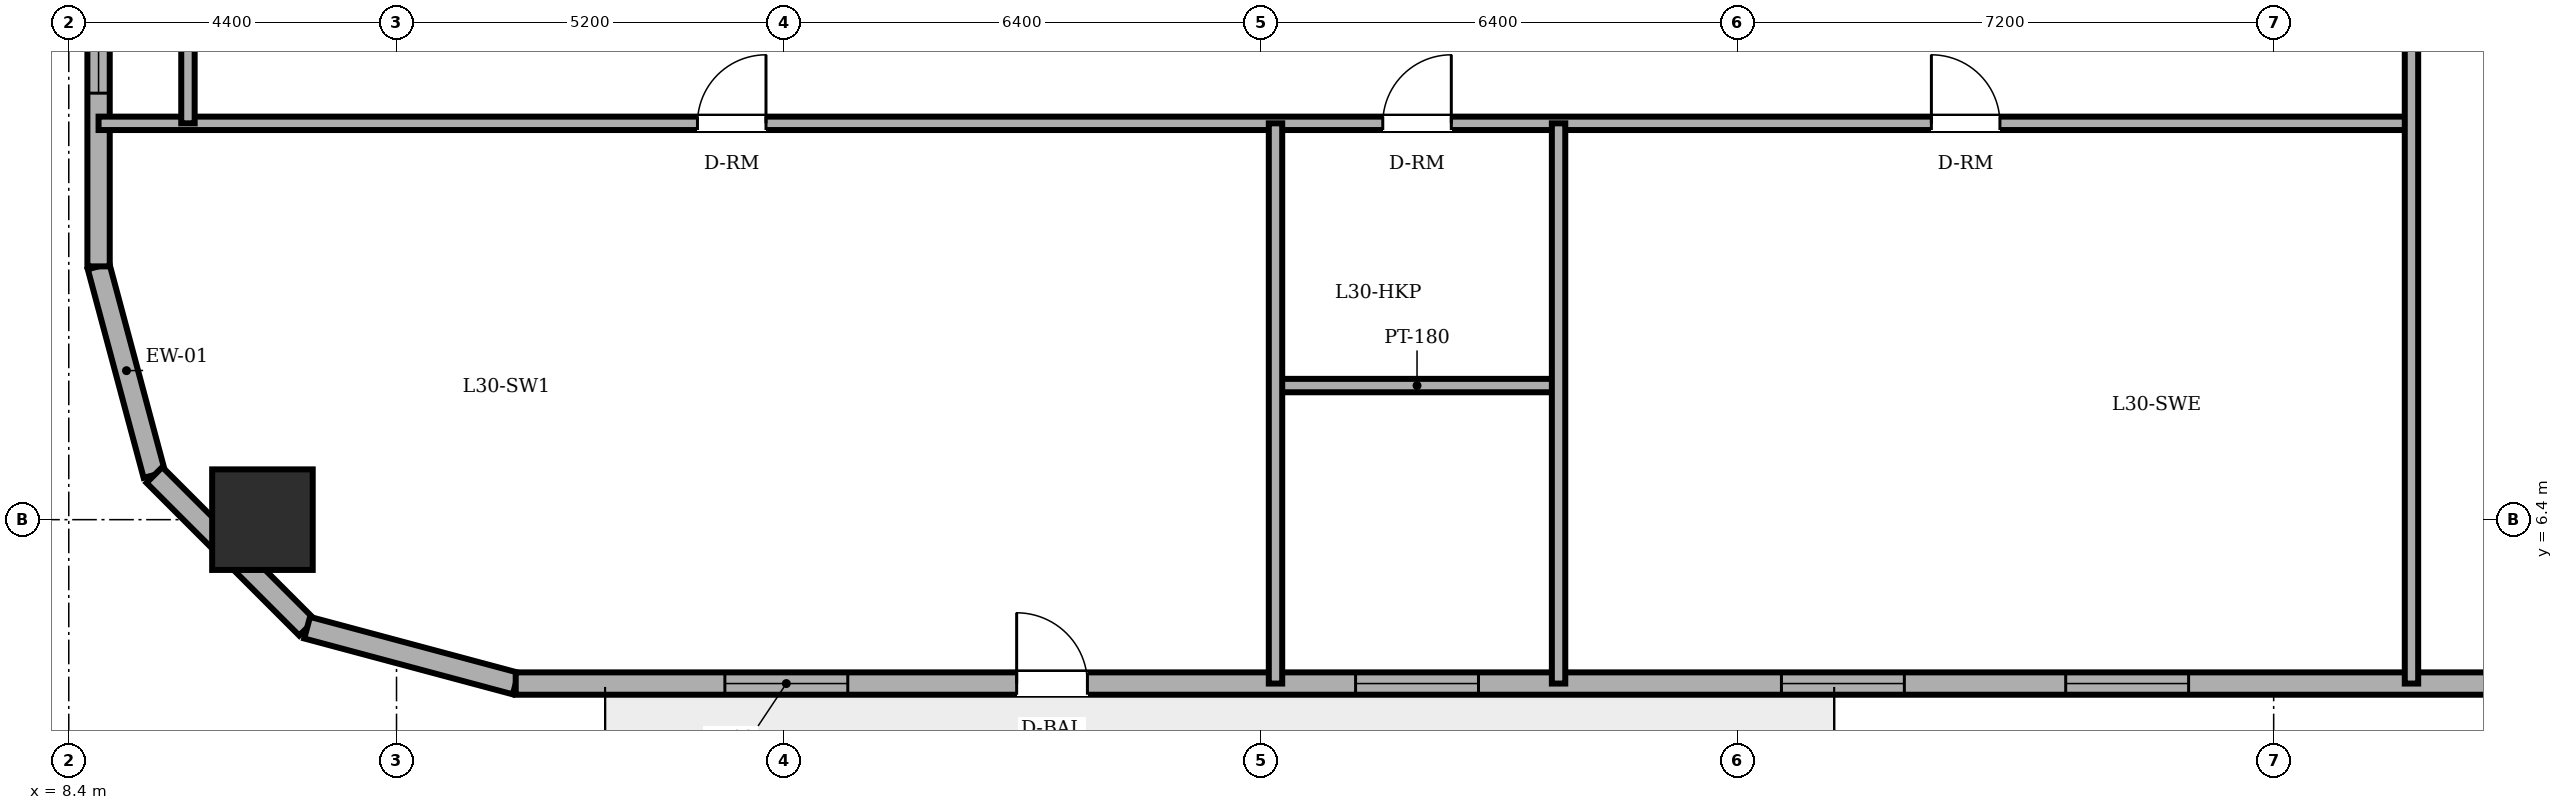
"""IFC4 building model, lengths in metres.
Left out: names, types, materials, properties, quantities, classifications, styles, units other than length and angle.
Written with IfcOpenShell. Run it as: python <this file> out.ifc"""

import sys

from ifc_helpers import new_model, si_unit, direction, frame, frame_2d, origin, origin_2d, place, context, subcontext, project, spatial, rectangle, circle, extrude, element, fill, save


model = new_model("IFC4")
c1 = context("Model", 3, precision=1e-05, world=origin(), true_north=direction((0.0, 1.0)))
c2 = subcontext(c1, "Body", "Model", "MODEL_VIEW")
j1 = project(units=[si_unit("LENGTHUNIT", "METRE"), si_unit("PLANEANGLEUNIT", "RADIAN")], contexts=[c1])
p1 = place(None, origin())
s1 = spatial("IfcSite", under=j1, at=p1, CompositionType="ELEMENT")
p2 = place(p1, origin())
s2 = spatial("IfcBuilding", under=s1, at=p2, CompositionType="ELEMENT")
p3 = place(p2, frame((0.0, 0.0, 115.1)))
s3 = spatial("IfcBuildingStorey", under=s2, at=p3, CompositionType="ELEMENT", Elevation=115.1)
p4 = place(p3, frame((11.0, 6.4, 0.0), z_axis=(0.0, 0.0, 1.0), x_axis=(1.0, 0.0, 0.0)))
e1 = element("IfcColumn", 1, at=p4, inside=s3, PredefinedType="COLUMN", context=c2, shape_type="SweptSolid", body=[
    extrude(circle(Radius=0.675, at=origin_2d()), origin(), (0.0, 0.0, 1.0), 3.6),
])
p5 = place(p3, frame((8.8, 9.8, 0.0), z_axis=(0.0, 0.0, 1.0), x_axis=(0.258731875344, -0.96594917914, 0.0)))
e2 = element("IfcWall", 2, at=p5, inside=s3, PredefinedType="SOLIDWALL", context=c2, shape_type="SweptSolid", body=[
    extrude(rectangle(XDim=2.899, YDim=0.3, at=frame_2d((1.449, 0.0))), origin(), (0.0, 0.0, 1.0), 3.4),
])
p6 = place(p3, frame((9.55, 7.0, 0.0), z_axis=(0.0, 0.0, 1.0), x_axis=(0.707106781187, -0.707106781187, 0.0)))
e3 = element("IfcWall", 3, at=p6, inside=s3, PredefinedType="SOLIDWALL", context=c2, shape_type="SweptSolid", body=[
    extrude(rectangle(XDim=2.899, YDim=0.3, at=frame_2d((1.45, 0.0))), origin(), (0.0, 0.0, 1.0), 3.4),
])
p7 = place(p3, frame((11.6, 4.95, 0.0), z_axis=(0.0, 0.0, 1.0), x_axis=(0.965943540406, -0.258752926066, 0.0)))
e4 = element("IfcWall", 4, at=p7, inside=s3, PredefinedType="SOLIDWALL", context=c2, shape_type="SweptSolid", body=[
    extrude(rectangle(XDim=2.898, YDim=0.3, at=frame_2d((1.449, 0.0))), origin(), (0.0, 0.0, 1.0), 3.4),
])
p8 = place(p3, frame((14.4, 4.2, 0.0), z_axis=(0.0, 0.0, 1.0), x_axis=(1.0, 0.0, 0.0)))
e5 = element("IfcWall", 5, at=p8, inside=s3, PredefinedType="SOLIDWALL", context=c2, shape_type="SweptSolid", body=[
    extrude(rectangle(XDim=29.933, YDim=0.3, at=frame_2d((14.967, 0.0))), origin(), (0.0, 0.0, 1.0), 3.4),
])
p9 = place(p8, frame((6.725, 0.0, 0.0)))
e6 = element("IfcOpeningElement", 6, at=p9, cuts=e5, PredefinedType="OPENING", context=c2, shape_type="SweptSolid", body=[
    extrude(rectangle(XDim=0.95, YDim=2.2, at=frame_2d((0.475, 1.1))), frame((0.0, 0.16, 0.0), z_axis=(0.0, -1.0, 0.0), x_axis=(1.0, 0.0, 0.0)), (0.0, 0.0, 1.0), 0.32),
])
p10 = place(p8, frame((2.808, 0.0, 0.85)))
e7 = element("IfcOpeningElement", 7, at=p10, cuts=e5, PredefinedType="OPENING", context=c2, shape_type="SweptSolid", body=[
    extrude(rectangle(XDim=1.65, YDim=1.55, at=frame_2d((0.825, 0.775))), frame((0.0, 0.16, 0.0), z_axis=(0.0, -1.0, 0.0), x_axis=(1.0, 0.0, 0.0)), (0.0, 0.0, 1.0), 0.32),
])
p11 = place(p8, frame((11.275, 0.0, 0.85)))
e8 = element("IfcOpeningElement", 8, at=p11, cuts=e5, PredefinedType="OPENING", context=c2, shape_type="SweptSolid", body=[
    extrude(rectangle(XDim=1.65, YDim=1.55, at=frame_2d((0.825, 0.775))), frame((0.0, 0.16, 0.0), z_axis=(0.0, -1.0, 0.0), x_axis=(1.0, 0.0, 0.0)), (0.0, 0.0, 1.0), 0.32),
])
p12 = place(p8, frame((16.992, 0.0, 0.85)))
e9 = element("IfcOpeningElement", 9, at=p12, cuts=e5, PredefinedType="OPENING", context=c2, shape_type="SweptSolid", body=[
    extrude(rectangle(XDim=1.65, YDim=1.55, at=frame_2d((0.825, 0.775))), frame((0.0, 0.16, 0.0), z_axis=(0.0, -1.0, 0.0), x_axis=(1.0, 0.0, 0.0)), (0.0, 0.0, 1.0), 0.32),
])
p13 = place(p8, frame((20.808, 0.0, 0.85)))
e10 = element("IfcOpeningElement", 10, at=p13, cuts=e5, PredefinedType="OPENING", context=c2, shape_type="SweptSolid", body=[
    extrude(rectangle(XDim=1.65, YDim=1.55, at=frame_2d((0.825, 0.775))), frame((0.0, 0.16, 0.0), z_axis=(0.0, -1.0, 0.0), x_axis=(1.0, 0.0, 0.0)), (0.0, 0.0, 1.0), 0.32),
])
p14 = place(p8, frame((26.692, 0.0, 0.85)))
e11 = element("IfcOpeningElement", 11, at=p14, cuts=e5, PredefinedType="OPENING", context=c2, shape_type="SweptSolid", body=[
    extrude(rectangle(XDim=1.65, YDim=1.55, at=frame_2d((0.825, 0.775))), frame((0.0, 0.16, 0.0), z_axis=(0.0, -1.0, 0.0), x_axis=(1.0, 0.0, 0.0)), (0.0, 0.0, 1.0), 0.32),
])
p15 = place(p3, frame((8.8, 38.2, 0.0), z_axis=(0.0, 0.0, 1.0), x_axis=(0.0, -1.0, 0.0)))
e12 = element("IfcWall", 12, at=p15, inside=s3, PredefinedType="SOLIDWALL", context=c2, shape_type="SweptSolid", body=[
    extrude(rectangle(XDim=28.4, YDim=0.3, at=frame_2d((14.2, 0.0))), origin(), (0.0, 0.0, 1.0), 3.4),
])
p16 = place(p15, frame((2.325, 0.0, 0.85)))
e13 = element("IfcOpeningElement", 13, at=p16, cuts=e12, PredefinedType="OPENING", context=c2, shape_type="SweptSolid", body=[
    extrude(rectangle(XDim=1.65, YDim=1.55, at=frame_2d((0.825, 0.775))), frame((0.0, 0.16, 0.0), z_axis=(0.0, -1.0, 0.0), x_axis=(1.0, 0.0, 0.0)), (0.0, 0.0, 1.0), 0.32),
])
p17 = place(p15, frame((6.828, 0.0, 0.85)))
e14 = element("IfcOpeningElement", 14, at=p17, cuts=e12, PredefinedType="OPENING", context=c2, shape_type="SweptSolid", body=[
    extrude(rectangle(XDim=1.65, YDim=1.55, at=frame_2d((0.825, 0.775))), frame((0.0, 0.16, 0.0), z_axis=(0.0, -1.0, 0.0), x_axis=(1.0, 0.0, 0.0)), (0.0, 0.0, 1.0), 0.32),
])
p18 = place(p15, frame((10.102, 0.0, 0.85)))
e15 = element("IfcOpeningElement", 15, at=p18, cuts=e12, PredefinedType="OPENING", context=c2, shape_type="SweptSolid", body=[
    extrude(rectangle(XDim=1.65, YDim=1.55, at=frame_2d((0.825, 0.775))), frame((0.0, 0.16, 0.0), z_axis=(0.0, -1.0, 0.0), x_axis=(1.0, 0.0, 0.0)), (0.0, 0.0, 1.0), 0.32),
])
p19 = place(p15, frame((16.648, 0.0, 0.85)))
e16 = element("IfcOpeningElement", 16, at=p19, cuts=e12, PredefinedType="OPENING", context=c2, shape_type="SweptSolid", body=[
    extrude(rectangle(XDim=1.65, YDim=1.55, at=frame_2d((0.825, 0.775))), frame((0.0, 0.16, 0.0), z_axis=(0.0, -1.0, 0.0), x_axis=(1.0, 0.0, 0.0)), (0.0, 0.0, 1.0), 0.32),
])
p20 = place(p15, frame((19.922, 0.0, 0.85)))
e17 = element("IfcOpeningElement", 17, at=p20, cuts=e12, PredefinedType="OPENING", context=c2, shape_type="SweptSolid", body=[
    extrude(rectangle(XDim=1.65, YDim=1.55, at=frame_2d((0.825, 0.775))), frame((0.0, 0.16, 0.0), z_axis=(0.0, -1.0, 0.0), x_axis=(1.0, 0.0, 0.0)), (0.0, 0.0, 1.0), 0.32),
])
p21 = place(p15, frame((24.425, 0.0, 0.85)))
e18 = element("IfcOpeningElement", 18, at=p21, cuts=e12, PredefinedType="OPENING", context=c2, shape_type="SweptSolid", body=[
    extrude(rectangle(XDim=1.65, YDim=1.55, at=frame_2d((0.825, 0.775))), frame((0.0, 0.16, 0.0), z_axis=(0.0, -1.0, 0.0), x_axis=(1.0, 0.0, 0.0)), (0.0, 0.0, 1.0), 0.32),
])
p22 = place(p3, frame((24.6, 8.2, 0.0), z_axis=(0.0, 0.0, 1.0), x_axis=(1.0, 0.0, 0.0)))
e19 = element("IfcWall", 19, at=p22, inside=s3, PredefinedType="PARTITIONING", context=c2, shape_type="SweptSolid", body=[
    extrude(rectangle(XDim=3.8, YDim=0.18, at=frame_2d((1.9, 0.0))), origin(), (0.0, 0.0, 1.0), 3.4),
])
p23 = place(p3, frame((8.8, 11.72, 0.0), z_axis=(0.0, 0.0, 1.0), x_axis=(1.0, 0.0, 0.0)))
e20 = element("IfcWall", 20, at=p23, inside=s3, PredefinedType="PARTITIONING", context=c2, shape_type="SweptSolid", body=[
    extrude(rectangle(XDim=31.05, YDim=0.18, at=frame_2d((15.525, 0.0))), origin(), (0.0, 0.0, 1.0), 3.4),
])
p24 = place(p23, frame((17.24, 0.0, 0.0)))
e21 = element("IfcOpeningElement", 21, at=p24, cuts=e20, PredefinedType="OPENING", context=c2, shape_type="SweptSolid", body=[
    extrude(rectangle(XDim=0.92, YDim=2.1, at=frame_2d((0.46, 1.05))), frame((0.0, 0.1, 0.0), z_axis=(0.0, -1.0, 0.0), x_axis=(1.0, 0.0, 0.0)), (0.0, 0.0, 1.0), 0.2),
])
p25 = place(p23, frame((8.04, 0.0, 0.0)))
e22 = element("IfcOpeningElement", 22, at=p25, cuts=e20, PredefinedType="OPENING", context=c2, shape_type="SweptSolid", body=[
    extrude(rectangle(XDim=0.92, YDim=2.1, at=frame_2d((0.46, 1.05))), frame((0.0, 0.1, 0.0), z_axis=(0.0, -1.0, 0.0), x_axis=(1.0, 0.0, 0.0)), (0.0, 0.0, 1.0), 0.2),
])
p26 = place(p23, frame((24.605, 0.0, 0.0)))
e23 = element("IfcOpeningElement", 23, at=p26, cuts=e20, PredefinedType="OPENING", context=c2, shape_type="SweptSolid", body=[
    extrude(rectangle(XDim=0.92, YDim=2.1, at=frame_2d((0.46, 1.05))), frame((0.0, 0.1, 0.0), z_axis=(0.0, -1.0, 0.0), x_axis=(1.0, 0.0, 0.0)), (0.0, 0.0, 1.0), 0.2),
])
p27 = place(p3, frame((10.0, 11.72, 0.0), z_axis=(0.0, 0.0, 1.0), x_axis=(0.0, 1.0, 0.0)))
e24 = element("IfcWall", 24, at=p27, inside=s3, PredefinedType="PARTITIONING", context=c2, shape_type="SweptSolid", body=[
    extrude(rectangle(XDim=2.46, YDim=0.18, at=frame_2d((1.23, 0.0))), origin(), (0.0, 0.0, 1.0), 3.4),
])
for number, where, z_axis, x_axis in (
    (25, (24.6, 4.2, 0.0), (0.0, 0.0, 1.0), (0.0, 1.0, 0.0)),
    (26, (28.4, 4.2, 0.0), (0.0, 0.0, 1.0), (0.0, 1.0, 0.0)),
):
    element("IfcWall", number, at=place(p3, frame(where, z_axis=z_axis, x_axis=x_axis)), inside=s3, PredefinedType="PARTITIONING", context=c2, shape_type="SweptSolid", body=[
        extrude(rectangle(XDim=7.52, YDim=0.18, at=frame_2d((3.76, 0.0))), origin(), (0.0, 0.0, 1.0), 3.4),
    ])
p28 = place(p3, frame((39.85, 4.2, 0.0), z_axis=(0.0, 0.0, 1.0), x_axis=(0.0, 1.0, 0.0)))
e27 = element("IfcWall", 27, at=p28, inside=s3, PredefinedType="PARTITIONING", context=c2, shape_type="SweptSolid", body=[
    extrude(rectangle(XDim=18.62, YDim=0.18, at=frame_2d((9.31, 0.0))), origin(), (0.0, 0.0, 1.0), 3.4),
])
p29 = place(p28, frame((12.35, 0.0, 0.0)))
e28 = element("IfcOpeningElement", 28, at=p29, cuts=e27, PredefinedType="OPENING", context=c2, shape_type="SweptSolid", body=[
    extrude(rectangle(XDim=0.92, YDim=2.1, at=frame_2d((0.46, 1.05))), frame((0.0, 0.1, 0.0), z_axis=(0.0, -1.0, 0.0), x_axis=(1.0, 0.0, 0.0)), (0.0, 0.0, 1.0), 0.2),
])
p30 = place(p9, origin())
e29 = element("IfcDoor", 29, at=p30, inside=s3, OperationType="SINGLE_SWING_LEFT", PredefinedType="DOOR", context=c2, shape_type="SweptSolid", body=[
    extrude(rectangle(XDim=0.95, YDim=2.2, at=frame_2d((0.475, 1.1))), frame((0.0, 0.025, 0.0), z_axis=(0.0, -1.0, 0.0), x_axis=(1.0, 0.0, 0.0)), (0.0, 0.0, 1.0), 0.05),
])
fill(e6, e29)
p31 = place(p10, origin())
e30 = element("IfcWindow", 30, at=p31, inside=s3, PartitioningType="DOUBLE_PANEL_VERTICAL", PredefinedType="WINDOW", context=c2, shape_type="SweptSolid", body=[
    extrude(rectangle(XDim=1.65, YDim=1.55, at=frame_2d((0.825, 0.775))), frame((0.0, 0.03, 0.0), z_axis=(0.0, -1.0, 0.0), x_axis=(1.0, 0.0, 0.0)), (0.0, 0.0, 1.0), 0.06),
])
fill(e7, e30)
p32 = place(p11, origin())
e31 = element("IfcWindow", 31, at=p32, inside=s3, PartitioningType="DOUBLE_PANEL_VERTICAL", PredefinedType="WINDOW", context=c2, shape_type="SweptSolid", body=[
    extrude(rectangle(XDim=1.65, YDim=1.55, at=frame_2d((0.825, 0.775))), frame((0.0, 0.03, 0.0), z_axis=(0.0, -1.0, 0.0), x_axis=(1.0, 0.0, 0.0)), (0.0, 0.0, 1.0), 0.06),
])
fill(e8, e31)
p33 = place(p12, origin())
e32 = element("IfcWindow", 32, at=p33, inside=s3, PartitioningType="DOUBLE_PANEL_VERTICAL", PredefinedType="WINDOW", context=c2, shape_type="SweptSolid", body=[
    extrude(rectangle(XDim=1.65, YDim=1.55, at=frame_2d((0.825, 0.775))), frame((0.0, 0.03, 0.0), z_axis=(0.0, -1.0, 0.0), x_axis=(1.0, 0.0, 0.0)), (0.0, 0.0, 1.0), 0.06),
])
fill(e9, e32)
p34 = place(p13, origin())
e33 = element("IfcWindow", 33, at=p34, inside=s3, PartitioningType="DOUBLE_PANEL_VERTICAL", PredefinedType="WINDOW", context=c2, shape_type="SweptSolid", body=[
    extrude(rectangle(XDim=1.65, YDim=1.55, at=frame_2d((0.825, 0.775))), frame((0.0, 0.03, 0.0), z_axis=(0.0, -1.0, 0.0), x_axis=(1.0, 0.0, 0.0)), (0.0, 0.0, 1.0), 0.06),
])
fill(e10, e33)
p35 = place(p21, origin())
e34 = element("IfcWindow", 34, at=p35, inside=s3, PartitioningType="DOUBLE_PANEL_VERTICAL", PredefinedType="WINDOW", context=c2, shape_type="SweptSolid", body=[
    extrude(rectangle(XDim=1.65, YDim=1.55, at=frame_2d((0.825, 0.775))), frame((0.0, 0.03, 0.0), z_axis=(0.0, -1.0, 0.0), x_axis=(1.0, 0.0, 0.0)), (0.0, 0.0, 1.0), 0.06),
])
fill(e18, e34)
p36 = place(p24, origin())
e35 = element("IfcDoor", 35, at=p36, inside=s3, OperationType="SINGLE_SWING_RIGHT", PredefinedType="DOOR", context=c2, shape_type="SweptSolid", body=[
    extrude(rectangle(XDim=0.92, YDim=2.1, at=frame_2d((0.46, 1.05))), frame((0.0, 0.025, 0.0), z_axis=(0.0, -1.0, 0.0), x_axis=(1.0, 0.0, 0.0)), (0.0, 0.0, 1.0), 0.05),
])
fill(e21, e35)
p37 = place(p25, origin())
e36 = element("IfcDoor", 36, at=p37, inside=s3, OperationType="SINGLE_SWING_RIGHT", PredefinedType="DOOR", context=c2, shape_type="SweptSolid", body=[
    extrude(rectangle(XDim=0.92, YDim=2.1, at=frame_2d((0.46, 1.05))), frame((0.0, 0.025, 0.0), z_axis=(0.0, -1.0, 0.0), x_axis=(1.0, 0.0, 0.0)), (0.0, 0.0, 1.0), 0.05),
])
fill(e22, e36)
p38 = place(p26, origin())
e37 = element("IfcDoor", 37, at=p38, inside=s3, OperationType="SINGLE_SWING_LEFT", PredefinedType="DOOR", context=c2, shape_type="SweptSolid", body=[
    extrude(rectangle(XDim=0.92, YDim=2.1, at=frame_2d((0.46, 1.05))), frame((0.0, 0.025, 0.0), z_axis=(0.0, -1.0, 0.0), x_axis=(1.0, 0.0, 0.0)), (0.0, 0.0, 1.0), 0.05),
])
fill(e23, e37)
save(model, sys.argv[1])
